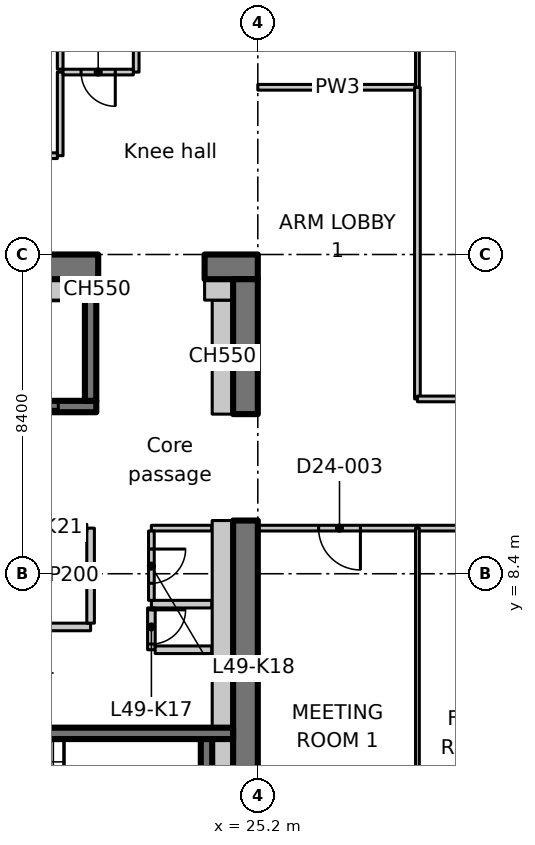
"""IFC4 building model, lengths in metres.
Left out: names, types, materials, properties, quantities, classifications, styles, units other than length and angle.
Written with IfcOpenShell. Run it as: python <this file> out.ifc"""

import sys

from ifc_helpers import new_model, si_unit, direction, frame, frame_2d, origin, place, context, subcontext, project, spatial, polyline, rectangle, outline, extrude, element, fill, save


model = new_model("IFC4")
c1 = context("Model", 3, precision=1e-05, world=origin(), true_north=direction((0.0, 1.0)))
c2 = subcontext(c1, "Body", "Model", "MODEL_VIEW")
j1 = project(units=[si_unit("LENGTHUNIT", "METRE"), si_unit("PLANEANGLEUNIT", "RADIAN")], contexts=[c1])
p1 = place(None, origin())
s1 = spatial("IfcSite", under=j1, at=p1, CompositionType="ELEMENT")
p2 = place(p1, origin())
s2 = spatial("IfcBuilding", under=s1, at=p2, CompositionType="ELEMENT")
p3 = place(p2, frame((0.0, 0.0, 195.6)))
s3 = spatial("IfcBuildingStorey", under=s2, at=p3, CompositionType="ELEMENT", Elevation=195.6)
p4 = place(p3, frame((-1.1, 16.475, 0.0), z_axis=(0.0, 0.0, 1.0), x_axis=(1.0, 0.0, 0.0)))
e1 = element("IfcWall", 1, at=p4, inside=s3, PredefinedType="SHEAR", context=c2, shape_type="SweptSolid", body=[
    extrude(rectangle(XDim=22.1, YDim=0.65, at=frame_2d((11.05, 0.0))), origin(), (0.0, 0.0, 1.0), 3.35),
])
p5 = place(p4, frame((3.15, 0.0, 0.0)))
e2 = element("IfcOpeningElement", 2, at=p5, cuts=e1, PredefinedType="OPENING", context=c2, shape_type="SweptSolid", body=[
    extrude(rectangle(XDim=1.1, YDim=2.3, at=frame_2d((0.55, 1.15))), frame((0.0, 0.335, 0.0), z_axis=(0.0, -1.0, 0.0), x_axis=(1.0, 0.0, 0.0)), (0.0, 0.0, 1.0), 0.67),
])
p6 = place(p3, frame((23.8, 16.475, 0.0), z_axis=(0.0, 0.0, 1.0), x_axis=(1.0, 0.0, 0.0)))
e3 = element("IfcWall", 3, at=p6, inside=s3, PredefinedType="SHEAR", context=c2, shape_type="SweptSolid", body=[
    extrude(rectangle(XDim=1.4, YDim=0.65, at=frame_2d((0.7, 0.0))), origin(), (0.0, 0.0, 1.0), 3.35),
])
p7 = place(p3, frame((24.875, 0.65, 0.0), z_axis=(0.0, 0.0, 1.0), x_axis=(0.0, 1.0, 0.0)))
e4 = element("IfcWall", 4, at=p7, inside=s3, PredefinedType="SHEAR", context=c2, shape_type="SweptSolid", body=[
    extrude(rectangle(XDim=9.15, YDim=0.65, at=frame_2d((4.575, 0.0))), origin(), (0.0, 0.0, 1.0), 3.35),
])
p8 = place(p3, frame((24.875, 12.6, 0.0), z_axis=(0.0, 0.0, 1.0), x_axis=(0.0, 1.0, 0.0)))
e5 = element("IfcWall", 5, at=p8, inside=s3, PredefinedType="SHEAR", context=c2, shape_type="SweptSolid", body=[
    extrude(rectangle(XDim=3.55, YDim=0.65, at=frame_2d((1.775, 0.0))), origin(), (0.0, 0.0, 1.0), 3.35),
])
p9 = place(p3, frame((24.275, 12.6, 0.0), z_axis=(0.0, 0.0, 1.0), x_axis=(0.0, 1.0, 0.0)))
e6 = element("IfcWall", 6, at=p9, inside=s3, PredefinedType="PARTITIONING", context=c2, shape_type="SweptSolid", body=[
    extrude(rectangle(XDim=3.0, YDim=0.55, at=frame_2d((1.5, 0.0))), origin(), (0.0, 0.0, 1.0), 3.35),
])
p10 = place(p3, frame((23.8, 15.875, 0.0), z_axis=(0.0, 0.0, 1.0), x_axis=(1.0, 0.0, 0.0)))
e7 = element("IfcWall", 7, at=p10, inside=s3, PredefinedType="PARTITIONING", context=c2, shape_type="SweptSolid", body=[
    extrude(rectangle(XDim=0.75, YDim=0.55, at=frame_2d((0.375, 0.0))), origin(), (0.0, 0.0, 1.0), 3.35),
])
p11 = place(p3, frame((17.85, 12.8, 0.0), z_axis=(0.0, 0.0, 1.0), x_axis=(1.0, 0.0, 0.0)))
e8 = element("IfcWall", 8, at=p11, inside=s3, PredefinedType="SHEAR", context=c2, shape_type="SweptSolid", body=[
    extrude(rectangle(XDim=3.1, YDim=0.3, at=frame_2d((1.55, 0.0))), origin(), (0.0, 0.0, 1.0), 3.35),
])
p12 = place(p11, frame((1.0, 0.0, 0.0)))
e9 = element("IfcOpeningElement", 9, at=p12, cuts=e8, PredefinedType="OPENING", context=c2, shape_type="SweptSolid", body=[
    extrude(rectangle(XDim=1.1, YDim=2.3, at=frame_2d((0.55, 1.15))), frame((0.0, 0.16, 0.0), z_axis=(0.0, -1.0, 0.0), x_axis=(1.0, 0.0, 0.0)), (0.0, 0.0, 1.0), 0.32),
])
p13 = place(p3, frame((20.8, 12.95, 0.0), z_axis=(0.0, 0.0, 1.0), x_axis=(0.0, 1.0, 0.0)))
e10 = element("IfcWall", 10, at=p13, inside=s3, PredefinedType="SHEAR", context=c2, shape_type="SweptSolid", body=[
    extrude(rectangle(XDim=3.2, YDim=0.3, at=frame_2d((1.6, 0.0))), origin(), (0.0, 0.0, 1.0), 3.35),
])
p14 = place(p3, frame((15.8, 4.2, 0.0), z_axis=(0.0, 0.0, 1.0), x_axis=(1.0, 0.0, 0.0)))
e11 = element("IfcWall", 11, at=p14, inside=s3, PredefinedType="SHEAR", context=c2, shape_type="SweptSolid", body=[
    extrude(rectangle(XDim=8.75, YDim=0.3, at=frame_2d((4.375, 0.0))), origin(), (0.0, 0.0, 1.0), 3.35),
])
p15 = place(p14, frame((0.4, 0.0, 0.0)))
e12 = element("IfcOpeningElement", 12, at=p15, cuts=e11, PredefinedType="OPENING", context=c2, shape_type="SweptSolid", body=[
    extrude(rectangle(XDim=1.0, YDim=2.1, at=frame_2d((0.5, 1.05))), frame((0.0, 0.16, 0.0), z_axis=(0.0, -1.0, 0.0), x_axis=(1.0, 0.0, 0.0)), (0.0, 0.0, 1.0), 0.32),
])
p16 = place(p3, frame((23.85, 1.5, 0.0), z_axis=(0.0, 0.0, 1.0), x_axis=(0.0, 1.0, 0.0)))
e13 = element("IfcWall", 13, at=p16, inside=s3, PredefinedType="SHEAR", context=c2, shape_type="SweptSolid", body=[
    extrude(rectangle(XDim=2.55, YDim=0.3, at=frame_2d((1.275, 0.0))), origin(), (0.0, 0.0, 1.0), 3.35),
])
p17 = place(p3, frame((12.4, 7.0, 0.0), z_axis=(0.0, 0.0, 1.0), x_axis=(1.0, 0.0, 0.0)))
e14 = element("IfcWall", 14, at=p17, inside=s3, PredefinedType="PARTITIONING", context=c2, shape_type="SweptSolid", body=[
    extrude(rectangle(XDim=8.4, YDim=0.2, at=frame_2d((4.2, 0.0))), origin(), (0.0, 0.0, 1.0), 3.35),
])
p18 = place(p3, frame((20.8, 7.1, 0.0), z_axis=(0.0, 0.0, 1.0), x_axis=(0.0, 1.0, 0.0)))
e15 = element("IfcWall", 15, at=p18, inside=s3, PredefinedType="PARTITIONING", context=c2, shape_type="SweptSolid", body=[
    extrude(rectangle(XDim=2.5, YDim=0.2, at=frame_2d((1.25, 0.0))), origin(), (0.0, 0.0, 1.0), 3.35),
])
p19 = place(p3, frame((20.7, 9.6, 0.0), z_axis=(0.0, 0.0, 1.0), x_axis=(-1.0, 0.0, 0.0)))
e16 = element("IfcWall", 16, at=p19, inside=s3, PredefinedType="PARTITIONING", context=c2, shape_type="SweptSolid", body=[
    extrude(rectangle(XDim=8.3, YDim=0.2, at=frame_2d((4.15, 0.0))), origin(), (0.0, 0.0, 1.0), 3.35),
])
p20 = place(p19, frame((3.65, 0.0, 0.0)))
e17 = element("IfcOpeningElement", 17, at=p20, cuts=e16, PredefinedType="OPENING", context=c2, shape_type="SweptSolid", body=[
    extrude(rectangle(XDim=0.9, YDim=2.1, at=frame_2d((0.45, 1.05))), frame((0.0, 0.11, 0.0), z_axis=(0.0, -1.0, 0.0), x_axis=(1.0, 0.0, 0.0)), (0.0, 0.0, 1.0), 0.22),
])
p21 = place(p3, frame((23.988, 7.6, 0.0), z_axis=(0.0, 0.0, 1.0), x_axis=(-1.0, 0.0, 0.0)))
e18 = element("IfcWall", 18, at=p21, inside=s3, PredefinedType="PARTITIONING", context=c2, shape_type="SweptSolid", body=[
    extrude(rectangle(XDim=1.588, YDim=0.2, at=frame_2d((0.794, 0.0))), origin(), (0.0, 0.0, 1.0), 3.35),
])
p22 = place(p3, frame((22.4, 7.5, 0.0), z_axis=(0.0, 0.0, 1.0), x_axis=(0.0, -1.0, 0.0)))
e19 = element("IfcWall", 19, at=p22, inside=s3, PredefinedType="PARTITIONING", context=c2, shape_type="SweptSolid", body=[
    extrude(rectangle(XDim=1.1, YDim=0.2, at=frame_2d((0.55, 0.0))), origin(), (0.0, 0.0, 1.0), 3.35),
])
p23 = place(p22, frame((0.05, 0.0, 0.0)))
e20 = element("IfcOpeningElement", 20, at=p23, cuts=e19, PredefinedType="OPENING", context=c2, shape_type="SweptSolid", body=[
    extrude(rectangle(XDim=0.9, YDim=2.1, at=frame_2d((0.45, 1.05))), frame((0.0, 0.11, 0.0), z_axis=(0.0, -1.0, 0.0), x_axis=(1.0, 0.0, 0.0)), (0.0, 0.0, 1.0), 0.22),
])
p24 = place(p3, frame((22.5, 6.4, 0.0), z_axis=(0.0, 0.0, 1.0), x_axis=(1.0, 0.0, 0.0)))
e21 = element("IfcWall", 21, at=p24, inside=s3, PredefinedType="PARTITIONING", context=c2, shape_type="SweptSolid", body=[
    extrude(rectangle(XDim=1.488, YDim=0.2, at=frame_2d((0.744, 0.0))), origin(), (0.0, 0.0, 1.0), 3.35),
])
p25 = place(p3, frame((20.0, 21.6, 0.0), z_axis=(0.0, 0.0, 1.0), x_axis=(0.0, -1.0, 0.0)))
e22 = element("IfcWall", 22, at=p25, inside=s3, PredefinedType="PARTITIONING", context=c2, shape_type="SweptSolid", body=[
    extrude(rectangle(XDim=2.2, YDim=0.15, at=frame_2d((1.1, 0.0))), origin(), (0.0, 0.0, 1.0), 3.35),
])
p26 = place(p3, frame((19.925, 19.4, 0.0), z_axis=(0.0, 0.0, 1.0), x_axis=(-1.0, 0.0, 0.0)))
e23 = element("IfcWall", 23, at=p26, inside=s3, PredefinedType="PARTITIONING", context=c2, shape_type="SweptSolid", body=[
    extrude(rectangle(XDim=3.725, YDim=0.15, at=frame_2d((1.863, 0.0))), origin(), (0.0, 0.0, 1.0), 3.35),
])
p27 = place(p26, frame((1.325, 0.0, 0.0)))
e24 = element("IfcOpeningElement", 24, at=p27, cuts=e23, PredefinedType="OPENING", context=c2, shape_type="SweptSolid", body=[
    extrude(rectangle(XDim=1.0, YDim=2.1, at=frame_2d((0.5, 1.05))), frame((0.0, 0.085, 0.0), z_axis=(0.0, -1.0, 0.0), x_axis=(1.0, 0.0, 0.0)), (0.0, 0.0, 1.0), 0.17),
])
p28 = place(p3, frame((22.0, 23.925, 0.0), z_axis=(0.0, 0.0, 1.0), x_axis=(0.0, -1.0, 0.0)))
e25 = element("IfcWall", 25, at=p28, inside=s3, PredefinedType="PARTITIONING", context=c2, shape_type="SweptSolid", body=[
    extrude(rectangle(XDim=2.325, YDim=0.15, at=frame_2d((1.163, 0.0))), origin(), (0.0, 0.0, 1.0), 3.35),
])
p29 = place(p3, frame((21.925, 21.6, 0.0), z_axis=(0.0, 0.0, 1.0), x_axis=(-1.0, 0.0, 0.0)))
e26 = element("IfcWall", 26, at=p29, inside=s3, PredefinedType="PARTITIONING", context=c2, shape_type="SweptSolid", body=[
    extrude(rectangle(XDim=1.85, YDim=0.15, at=frame_2d((0.925, 0.0))), origin(), (0.0, 0.0, 1.0), 3.35),
])
p30 = place(p29, frame((0.475, 0.0, 0.0)))
e27 = element("IfcOpeningElement", 27, at=p30, cuts=e26, PredefinedType="OPENING", context=c2, shape_type="SweptSolid", body=[
    extrude(rectangle(XDim=0.9, YDim=2.1, at=frame_2d((0.45, 1.05))), frame((0.0, 0.085, 0.0), z_axis=(0.0, -1.0, 0.0), x_axis=(1.0, 0.0, 0.0)), (0.0, 0.0, 1.0), 0.17),
])
p31 = place(p3, frame((20.0, 21.675, 0.0), z_axis=(0.0, 0.0, 1.0), x_axis=(0.0, 1.0, 0.0)))
e28 = element("IfcWall", 28, at=p31, inside=s3, PredefinedType="PARTITIONING", context=c2, shape_type="SweptSolid", body=[
    extrude(rectangle(XDim=2.15, YDim=0.15, at=frame_2d((1.075, 0.0))), origin(), (0.0, 0.0, 1.0), 3.35),
])
p32 = place(p3, frame((23.988, 9.6, 0.0), z_axis=(0.0, 0.0, 1.0), x_axis=(-1.0, 0.0, 0.0)))
e29 = element("IfcWall", 29, at=p32, inside=s3, PredefinedType="PARTITIONING", context=c2, shape_type="SweptSolid", body=[
    extrude(rectangle(XDim=1.588, YDim=0.15, at=frame_2d((0.794, 0.0))), origin(), (0.0, 0.0, 1.0), 3.35),
])
p33 = place(p3, frame((22.4, 9.525, 0.0), z_axis=(0.0, 0.0, 1.0), x_axis=(0.0, -1.0, 0.0)))
e30 = element("IfcWall", 30, at=p33, inside=s3, PredefinedType="PARTITIONING", context=c2, shape_type="SweptSolid", body=[
    extrude(rectangle(XDim=1.825, YDim=0.15, at=frame_2d((0.913, 0.0))), origin(), (0.0, 0.0, 1.0), 3.35),
])
p34 = place(p33, frame((0.475, 0.0, 0.0)))
e31 = element("IfcOpeningElement", 31, at=p34, cuts=e30, PredefinedType="OPENING", context=c2, shape_type="SweptSolid", body=[
    extrude(rectangle(XDim=0.9, YDim=2.1, at=frame_2d((0.45, 1.05))), frame((0.0, 0.085, 0.0), z_axis=(0.0, -1.0, 0.0), x_axis=(1.0, 0.0, 0.0)), (0.0, 0.0, 1.0), 0.17),
])
p35 = place(p3, frame((18.15, 15.875, 0.0), z_axis=(0.0, 0.0, 1.0), x_axis=(1.0, 0.0, 0.0)))
e32 = element("IfcWall", 32, at=p35, inside=s3, PredefinedType="PARTITIONING", context=c2, shape_type="SweptSolid", body=[
    extrude(rectangle(XDim=2.5, YDim=0.55, at=frame_2d((1.25, 0.0))), origin(), (0.0, 0.0, 1.0), 3.35),
])
p36 = place(p3, frame((20.95, 15.875, 0.0), z_axis=(0.0, 0.0, 1.0), x_axis=(1.0, 0.0, 0.0)))
e33 = element("IfcWall", 33, at=p36, inside=s3, PredefinedType="PARTITIONING", context=c2, shape_type="SweptSolid", body=[
    extrude(rectangle(XDim=0.05, YDim=0.55, at=frame_2d((0.025, 0.0))), origin(), (0.0, 0.0, 1.0), 3.35),
])
p37 = place(p3, frame((24.275, 1.5, 0.0), z_axis=(0.0, 0.0, 1.0), x_axis=(0.0, 1.0, 0.0)))
e34 = element("IfcWall", 34, at=p37, inside=s3, PredefinedType="PARTITIONING", context=c2, shape_type="SweptSolid", body=[
    extrude(rectangle(XDim=2.55, YDim=0.55, at=frame_2d((1.275, 0.0))), origin(), (0.0, 0.0, 1.0), 3.35),
])
p38 = place(p3, frame((24.275, 4.35, 0.0), z_axis=(0.0, 0.0, 1.0), x_axis=(0.0, 1.0, 0.0)))
e35 = element("IfcWall", 35, at=p38, inside=s3, PredefinedType="PARTITIONING", context=c2, shape_type="SweptSolid", body=[
    extrude(rectangle(XDim=5.45, YDim=0.55, at=frame_2d((2.725, 0.0))), origin(), (0.0, 0.0, 1.0), 3.35),
])
p39 = place(p3, frame((25.2, 21.2, 0.0), z_axis=(0.0, 0.0, 1.0), x_axis=(1.0, 0.0, 0.0)))
e36 = element("IfcWall", 36, at=p39, inside=s3, PredefinedType="PARTITIONING", context=c2, shape_type="SweptSolid", body=[
    extrude(rectangle(XDim=4.2, YDim=0.15, at=frame_2d((2.1, 0.0))), origin(), (0.0, 0.0, 1.0), 3.33),
])
p40 = place(p3, frame((29.4, 9.6, 0.0), z_axis=(0.0, 0.0, 1.0), x_axis=(-1.0, 0.0, 0.0)))
e37 = element("IfcWall", 37, at=p40, inside=s3, PredefinedType="PARTITIONING", context=c2, shape_type="SweptSolid", body=[
    extrude(rectangle(XDim=4.2, YDim=0.15, at=frame_2d((2.1, 0.0))), origin(), (0.0, 0.0, 1.0), 3.33),
])
p41 = place(p40, frame((1.5, 0.0, 0.0)))
e38 = element("IfcOpeningElement", 38, at=p41, cuts=e37, PredefinedType="OPENING", context=c2, shape_type="SweptSolid", body=[
    extrude(rectangle(XDim=1.1, YDim=2.1, at=frame_2d((0.55, 1.05))), frame((0.0, 0.085, 0.0), z_axis=(0.0, -1.0, 0.0), x_axis=(1.0, 0.0, 0.0)), (0.0, 0.0, 1.0), 0.17),
])
p42 = place(p3, frame((29.4, 21.2, 0.0), z_axis=(0.0, 0.0, 1.0), x_axis=(0.0, -1.0, 0.0)))
e39 = element("IfcWall", 39, at=p42, inside=s3, PredefinedType="PARTITIONING", context=c2, shape_type="SweptSolid", body=[
    extrude(rectangle(XDim=8.2, YDim=0.15, at=frame_2d((4.1, 0.0))), origin(), (0.0, 0.0, 1.0), 3.33),
])
p43 = place(p3, frame((29.4, 27.511, 0.0), z_axis=(0.0, 0.0, 1.0), x_axis=(0.0, -1.0, 0.0)))
e40 = element("IfcWall", 40, at=p43, inside=s3, PredefinedType="PARTITIONING", context=c2, shape_type="SweptSolid", body=[
    extrude(outline(polyline([(0.0, 0.0), (6.311, 0.0), (6.311, 3.33), (2.761, 3.33), (2.759, 2.98), (1.863, 2.98), (1.861, 3.33), (0.236, 3.33), (0.0, 3.33), (0.0, 0.0)])), frame((0.0, 0.05, 0.0), z_axis=(0.0, -1.0, 0.0), x_axis=(1.0, 0.0, 0.0)), (0.0, 0.0, 1.0), 0.1),
])
for number, where, z_axis, x_axis in (
    (41, (33.6, 9.6, 0.0), (0.0, 0.0, 1.0), (-1.0, 0.0, 0.0)),
    (42, (29.4, 13.0, 0.0), (0.0, 0.0, 1.0), (1.0, 0.0, 0.0)),
):
    element("IfcWall", number, at=place(p3, frame(where, z_axis=z_axis, x_axis=x_axis)), inside=s3, PredefinedType="PARTITIONING", context=c2, shape_type="SweptSolid", body=[
        extrude(rectangle(XDim=4.2, YDim=0.15, at=frame_2d((2.1, 0.0))), origin(), (0.0, 0.0, 1.0), 3.33),
    ])
p44 = place(p3, frame((29.4, 9.6, 0.0), z_axis=(0.0, 0.0, 1.0), x_axis=(0.0, -1.0, 0.0)))
e43 = element("IfcWall", 43, at=p44, inside=s3, PredefinedType="PARTITIONING", context=c2, shape_type="SweptSolid", body=[
    extrude(outline(polyline([(0.0, 0.0), (10.774, 0.0), (10.774, 3.33), (10.7, 3.33), (10.05, 3.33), (10.048, 2.98), (9.152, 2.98), (9.15, 3.33), (0.0, 3.33), (0.0, 0.0)])), frame((0.0, 0.05, 0.0), z_axis=(0.0, -1.0, 0.0), x_axis=(1.0, 0.0, 0.0)), (0.0, 0.0, 1.0), 0.1),
])
p45 = place(p12, origin())
e44 = element("IfcDoor", 44, at=p45, inside=s3, OperationType="SLIDING_TO_LEFT", PredefinedType="DOOR", context=c2, shape_type="SweptSolid", body=[
    extrude(rectangle(XDim=1.1, YDim=2.3, at=frame_2d((0.55, 1.15))), frame((0.0, 0.025, 0.0), z_axis=(0.0, -1.0, 0.0), x_axis=(1.0, 0.0, 0.0)), (0.0, 0.0, 1.0), 0.05),
])
fill(e9, e44)
p46 = place(p23, origin())
e45 = element("IfcDoor", 45, at=p46, inside=s3, OperationType="SINGLE_SWING_LEFT", PredefinedType="DOOR", context=c2, shape_type="SweptSolid", body=[
    extrude(rectangle(XDim=0.9, YDim=2.1, at=frame_2d((0.45, 1.05))), frame((0.0, 0.025, 0.0), z_axis=(0.0, -1.0, 0.0), x_axis=(1.0, 0.0, 0.0)), (0.0, 0.0, 1.0), 0.05),
])
fill(e20, e45)
p47 = place(p34, origin())
e46 = element("IfcDoor", 46, at=p47, inside=s3, OperationType="SINGLE_SWING_RIGHT", PredefinedType="DOOR", context=c2, shape_type="SweptSolid", body=[
    extrude(rectangle(XDim=0.9, YDim=2.1, at=frame_2d((0.45, 1.05))), frame((0.0, 0.025, 0.0), z_axis=(0.0, -1.0, 0.0), x_axis=(1.0, 0.0, 0.0)), (0.0, 0.0, 1.0), 0.05),
])
fill(e31, e46)
p48 = place(p30, origin())
e47 = element("IfcDoor", 47, at=p48, inside=s3, OperationType="SINGLE_SWING_LEFT", PredefinedType="DOOR", context=c2, shape_type="SweptSolid", body=[
    extrude(rectangle(XDim=0.9, YDim=2.1, at=frame_2d((0.45, 1.05))), frame((0.0, 0.025, 0.0), z_axis=(0.0, -1.0, 0.0), x_axis=(1.0, 0.0, 0.0)), (0.0, 0.0, 1.0), 0.05),
])
fill(e27, e47)
p49 = place(p41, origin())
e48 = element("IfcDoor", 48, at=p49, inside=s3, OperationType="SINGLE_SWING_LEFT", PredefinedType="DOOR", context=c2, shape_type="SweptSolid", body=[
    extrude(rectangle(XDim=1.1, YDim=2.1, at=frame_2d((0.55, 1.05))), frame((0.0, 0.025, 0.0), z_axis=(0.0, -1.0, 0.0), x_axis=(1.0, 0.0, 0.0)), (0.0, 0.0, 1.0), 0.05),
])
fill(e38, e48)
save(model, sys.argv[1])
